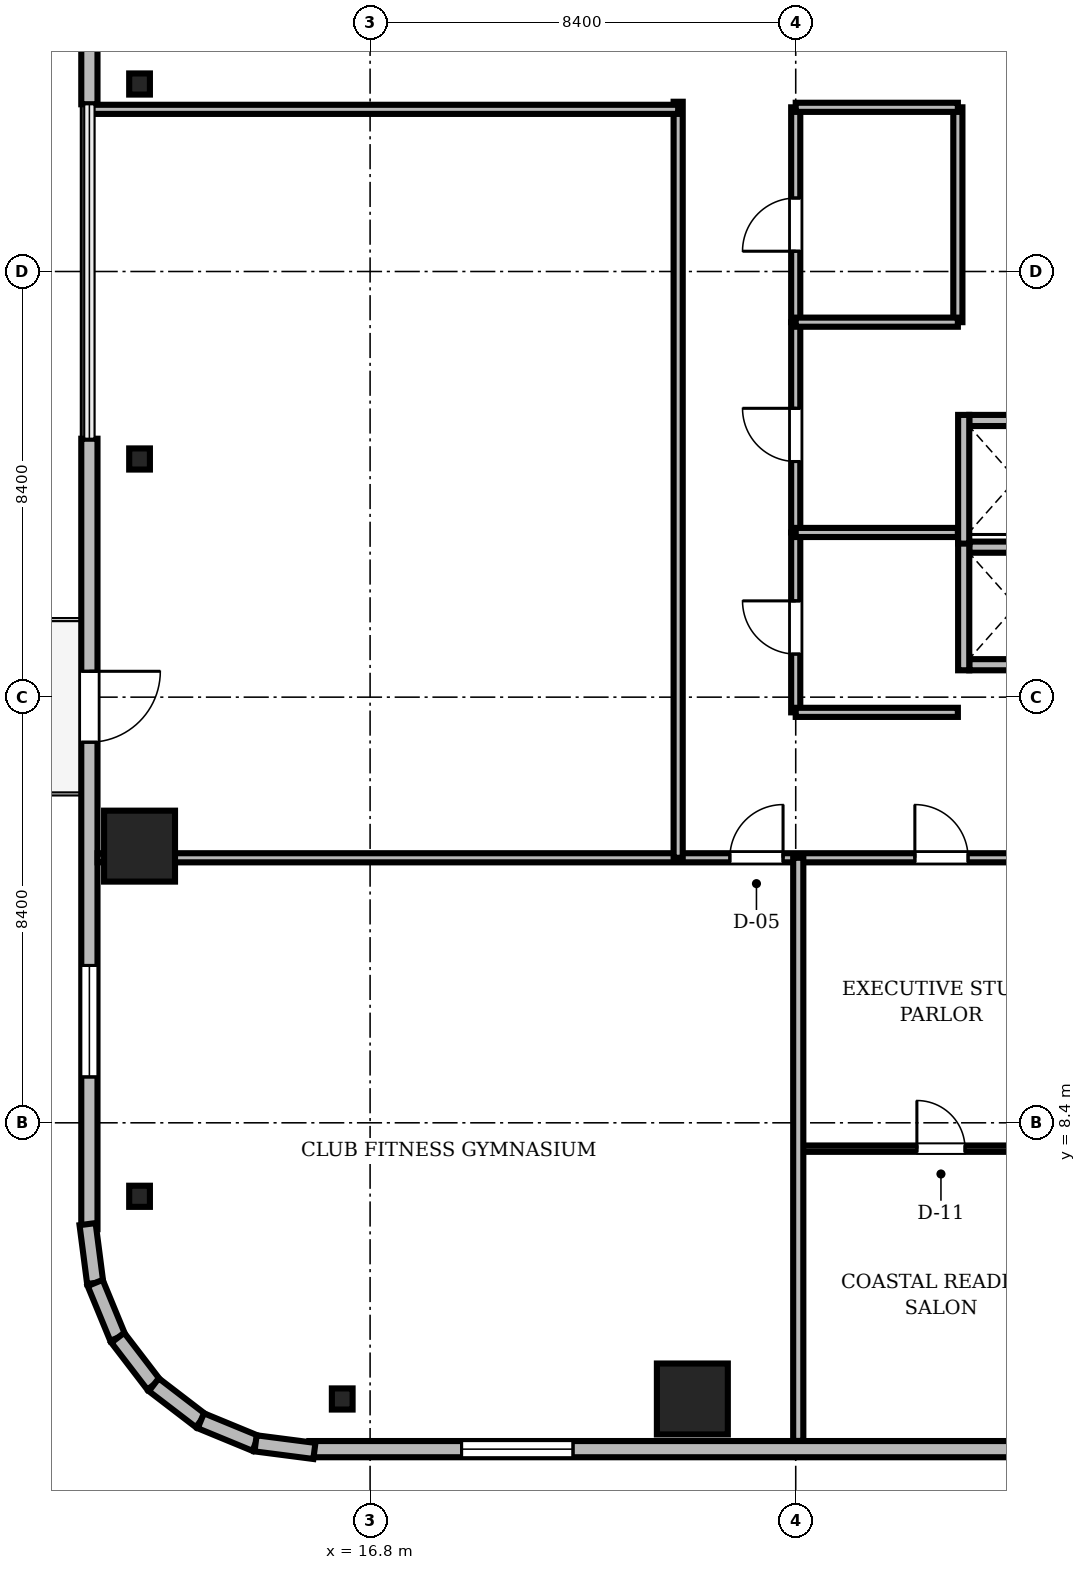
"""IFC4 building model, lengths in metres.
Left out: names, types, materials, properties, quantities, classifications, styles, units other than length and angle.
Written with IfcOpenShell. Run it as: python <this file> out.ifc"""

import sys

from ifc_helpers import new_model, si_unit, direction, frame, frame_2d, origin, origin_2d, place, context, subcontext, project, spatial, rectangle, i_section, extrude, source, transform, mapped, element, fill, save


model = new_model("IFC4")
c1 = context("Model", 3, precision=1e-05, world=origin(), true_north=direction((0.0, 1.0)))
c2 = subcontext(c1, "Body", "Model", "MODEL_VIEW")
j1 = project(units=[si_unit("LENGTHUNIT", "METRE"), si_unit("PLANEANGLEUNIT", "RADIAN")], contexts=[c1])
p1 = place(None, origin())
s1 = spatial("IfcSite", under=j1, at=p1, CompositionType="ELEMENT")
p2 = place(p1, origin())
s2 = spatial("IfcBuilding", under=s1, at=p2, CompositionType="ELEMENT")
p3 = place(p2, frame((0.0, 0.0, 229.8)))
s3 = spatial("IfcBuildingStorey", under=s2, at=p3, CompositionType="ELEMENT", Elevation=229.8)
m1 = source(origin(), c2, "Body", "SweptSolid", [
    extrude(rectangle(XDim=1.4, YDim=1.4, at=origin_2d()), origin(), (0.0, 0.0, 1.0), 3.53),
])
for number, where, z_axis, x_axis in (
    (1, (23.16, 2.95, 0.0), (0.0, 0.0, 1.0), (1.0, 0.0, 0.0)),
    (2, (12.25, 13.86, 0.0), (0.0, 0.0, 1.0), (1.0, 0.0, 0.0)),
):
    element("IfcColumn", number, at=place(p3, frame(where, z_axis=z_axis, x_axis=x_axis)), inside=s3, PredefinedType="COLUMN", context=c2, shape_type="MappedRepresentation", body=[
        mapped(m1, transform((0.0, 0.0, 0.0), scale=1.0)),
    ])
m2 = source(origin(), c2, "Body", "SweptSolid", [
    extrude(i_section(OverallWidth=0.409, OverallDepth=0.417, WebThickness=0.021, FlangeThickness=0.033, FilletRadius=0.015, at=origin_2d()), origin(), (0.0, 0.0, 1.0), 3.53),
])
for number, where, z_axis, x_axis in (
    (3, (16.25, 2.95, 0.0), (0.0, 0.0, 1.0), (1.0, 0.0, 0.0)),
    (4, (12.25, 28.9, 0.0), (0.0, 0.0, 1.0), (1.0, 0.0, 0.0)),
    (5, (12.25, 21.5, 0.0), (0.0, 0.0, 1.0), (1.0, 0.0, 0.0)),
    (6, (12.25, 6.95, 0.0), (0.0, 0.0, 1.0), (1.0, 0.0, 0.0)),
):
    element("IfcColumn", number, at=place(p3, frame(where, z_axis=z_axis, x_axis=x_axis)), inside=s3, PredefinedType="COLUMN", context=c2, shape_type="MappedRepresentation", body=[
        mapped(m2, transform((0.0, 0.0, 0.0), scale=1.0)),
    ])
m3 = source(origin(), c2, "Body", "SweptSolid", [
    extrude(rectangle(XDim=15.6, YDim=0.32, at=frame_2d((7.8, 0.0))), origin(), (0.0, 0.0, 1.0), 3.53),
])
p4 = place(p3, frame((15.6, 1.96, 0.0), z_axis=(0.0, 0.0, 1.0), x_axis=(1.0, 0.0, 0.0)))
e7 = element("IfcWall", 7, at=p4, inside=s3, PredefinedType="SOLIDWALL", context=c2, shape_type="MappedRepresentation", body=[
    mapped(m3, transform((0.0, 0.0, 0.0), scale=1.0)),
])
m4 = source(origin(), c2, "Body", "SweptSolid", [
    extrude(rectangle(XDim=2.2, YDim=2.4, at=frame_2d((1.1, 1.2))), frame((0.0, 0.17, 0.0), z_axis=(0.0, -1.0, 0.0), x_axis=(1.0, 0.0, 0.0)), (0.0, 0.0, 1.0), 0.34),
])
p5 = place(p4, frame((3.005, 0.0, 0.72)))
e8 = element("IfcOpeningElement", 8, at=p5, cuts=e7, PredefinedType="OPENING", context=c2, shape_type="MappedRepresentation", body=[
    mapped(m4, transform((0.0, 0.0, 0.0), scale=1.0)),
])
m5 = source(origin(), c2, "Body", "SweptSolid", [
    extrude(rectangle(XDim=15.6, YDim=0.32, at=frame_2d((7.8, 0.0))), origin(), (0.0, 0.0, 1.0), 3.53),
])
p6 = place(p3, frame((11.26, 44.1, 0.0), z_axis=(0.0, 0.0, 1.0), x_axis=(0.0, -1.0, 0.0)))
e9 = element("IfcWall", 9, at=p6, inside=s3, PredefinedType="SOLIDWALL", context=c2, shape_type="MappedRepresentation", body=[
    mapped(m5, transform((0.0, 0.0, 0.0), scale=1.0)),
])
p7 = place(p6, frame((3.005, 0.0, 0.72)))
e10 = element("IfcOpeningElement", 10, at=p7, cuts=e9, PredefinedType="OPENING", context=c2, shape_type="MappedRepresentation", body=[
    mapped(m4, transform((0.0, 0.0, 0.0), scale=1.0)),
])
p8 = place(p3, frame((11.26, 21.9, 0.0), z_axis=(0.0, 0.0, 1.0), x_axis=(0.0, -1.0, 0.0)))
e11 = element("IfcWall", 11, at=p8, inside=s3, PredefinedType="SOLIDWALL", context=c2, shape_type="MappedRepresentation", body=[
    mapped(m3, transform((0.0, 0.0, 0.0), scale=1.0)),
])
m6 = source(origin(), c2, "Body", "SweptSolid", [
    extrude(rectangle(XDim=1.4, YDim=2.3, at=frame_2d((0.7, 1.15))), frame((0.0, 0.17, 0.0), z_axis=(0.0, -1.0, 0.0), x_axis=(1.0, 0.0, 0.0)), (0.0, 0.0, 1.0), 0.34),
])
p9 = place(p8, frame((4.59, 0.0, 0.0)))
e12 = element("IfcOpeningElement", 12, at=p9, cuts=e11, PredefinedType="OPENING", context=c2, shape_type="MappedRepresentation", body=[
    mapped(m6, transform((0.0, 0.0, 0.0), scale=1.0)),
])
p10 = place(p8, frame((10.395, 0.0, 0.72)))
e13 = element("IfcOpeningElement", 13, at=p10, cuts=e11, PredefinedType="OPENING", context=c2, shape_type="MappedRepresentation", body=[
    mapped(m4, transform((0.0, 0.0, 0.0), scale=1.0)),
])
m7 = source(origin(), c2, "Body", "SweptSolid", [
    extrude(rectangle(XDim=1.171, YDim=0.32, at=frame_2d((0.585, 0.0))), origin(), (0.0, 0.0, 1.0), 3.53),
])
p11 = place(p3, frame((11.224, 6.401, 0.0), z_axis=(0.0, 0.0, 1.0), x_axis=(0.128269133229, -0.991739395941, 0.0)))
e14 = element("IfcWall", 14, at=p11, inside=s3, PredefinedType="SOLIDWALL", context=c2, shape_type="MappedRepresentation", body=[
    mapped(m7, transform((0.0, 0.0, 0.0), scale=1.0)),
])
m8 = source(origin(), c2, "Body", "SweptSolid", [
    extrude(rectangle(XDim=1.169, YDim=0.32, at=frame_2d((0.584, 0.0))), origin(), (0.0, 0.0, 1.0), 3.53),
])
for number, where, z_axis, x_axis in (
    (15, (11.375, 5.24, 0.0), (0.0, 0.0, 1.0), (0.381, -0.925, 0.0)),
    (16, (11.82, 4.159, 0.0), (0.0, 0.0, 1.0), (0.608, -0.794, 0.0)),
):
    element("IfcWall", number, at=place(p3, frame(where, z_axis=z_axis, x_axis=x_axis)), inside=s3, PredefinedType="SOLIDWALL", context=c2, shape_type="MappedRepresentation", body=[
        mapped(m8, transform((0.0, 0.0, 0.0), scale=1.0)),
    ])
m9 = source(origin(), c2, "Body", "SweptSolid", [
    extrude(rectangle(XDim=1.169, YDim=0.32, at=frame_2d((0.584, 0.0))), origin(), (0.0, 0.0, 1.0), 3.53),
])
p12 = place(p3, frame((12.531, 3.231, 0.0), z_axis=(0.0, 0.0, 1.0), x_axis=(0.793663520347, -0.608356981114, 0.0)))
e17 = element("IfcWall", 17, at=p12, inside=s3, PredefinedType="SOLIDWALL", context=c2, shape_type="MappedRepresentation", body=[
    mapped(m9, transform((0.0, 0.0, 0.0), scale=1.0)),
])
m10 = source(origin(), c2, "Body", "SweptSolid", [
    extrude(rectangle(XDim=1.169, YDim=0.32, at=frame_2d((0.585, 0.0))), origin(), (0.0, 0.0, 1.0), 3.53),
])
p13 = place(p3, frame((13.459, 2.52, 0.0), z_axis=(0.0, 0.0, 1.0), x_axis=(0.924479075121, -0.381232789334, 0.0)))
e18 = element("IfcWall", 18, at=p13, inside=s3, PredefinedType="SOLIDWALL", context=c2, shape_type="MappedRepresentation", body=[
    mapped(m10, transform((0.0, 0.0, 0.0), scale=1.0)),
])
m11 = source(origin(), c2, "Body", "SweptSolid", [
    extrude(rectangle(XDim=1.17, YDim=0.32, at=frame_2d((0.585, 0.0))), origin(), (0.0, 0.0, 1.0), 3.53),
])
p14 = place(p3, frame((14.54, 2.074, 0.0), z_axis=(0.0, 0.0, 1.0), x_axis=(0.991762485493, -0.128090485085, 0.0)))
e19 = element("IfcWall", 19, at=p14, inside=s3, PredefinedType="SOLIDWALL", context=c2, shape_type="MappedRepresentation", body=[
    mapped(m11, transform((0.0, 0.0, 0.0), scale=1.0)),
])
m12 = source(origin(), c2, "Body", "SweptSolid", [
    extrude(rectangle(XDim=1.85, YDim=0.22, at=frame_2d((0.925, 0.0))), origin(), (0.0, 0.0, 1.0), 2.972),
])
p15 = place(p3, frame((28.625, 17.44, 0.0), z_axis=(0.0, 0.0, 1.0), x_axis=(1.0, 0.0, 0.0)))
e20 = element("IfcWall", 20, at=p15, inside=s3, PredefinedType="SOLIDWALL", context=c2, shape_type="MappedRepresentation", body=[
    mapped(m12, transform((0.0, 0.0, 0.0), scale=1.0)),
])
m13 = source(origin(), c2, "Body", "SweptSolid", [
    extrude(rectangle(XDim=1.85, YDim=0.22, at=frame_2d((0.925, 0.0))), origin(), (0.0, 0.0, 1.0), 3.53),
])
p16 = place(p3, frame((28.625, 19.76, 0.0), z_axis=(0.0, 0.0, 1.0), x_axis=(1.0, 0.0, 0.0)))
e21 = element("IfcWall", 21, at=p16, inside=s3, PredefinedType="SOLIDWALL", context=c2, shape_type="MappedRepresentation", body=[
    mapped(m13, transform((0.0, 0.0, 0.0), scale=1.0)),
])
m14 = source(origin(), c2, "Body", "SweptSolid", [
    extrude(rectangle(XDim=2.54, YDim=0.22, at=frame_2d((1.27, 0.0))), origin(), (0.0, 0.0, 1.0), 2.972),
])
p17 = place(p3, frame((28.515, 17.33, 0.0), z_axis=(0.0, 0.0, 1.0), x_axis=(0.0, 1.0, 0.0)))
e22 = element("IfcWall", 22, at=p17, inside=s3, PredefinedType="SOLIDWALL", context=c2, shape_type="MappedRepresentation", body=[
    mapped(m14, transform((0.0, 0.0, 0.0), scale=1.0)),
])
p18 = place(p3, frame((28.625, 22.26, 0.0), z_axis=(0.0, 0.0, 1.0), x_axis=(1.0, 0.0, 0.0)))
e23 = element("IfcWall", 23, at=p18, inside=s3, PredefinedType="SOLIDWALL", context=c2, shape_type="MappedRepresentation", body=[
    mapped(m13, transform((0.0, 0.0, 0.0), scale=1.0)),
])
m15 = source(origin(), c2, "Body", "SweptSolid", [
    extrude(rectangle(XDim=2.54, YDim=0.22, at=frame_2d((1.27, 0.0))), origin(), (0.0, 0.0, 1.0), 3.53),
])
p19 = place(p3, frame((28.515, 19.83, 0.0), z_axis=(0.0, 0.0, 1.0), x_axis=(0.0, 1.0, 0.0)))
e24 = element("IfcWall", 24, at=p19, inside=s3, PredefinedType="SOLIDWALL", context=c2, shape_type="MappedRepresentation", body=[
    mapped(m15, transform((0.0, 0.0, 0.0), scale=1.0)),
])
m16 = source(origin(), c2, "Body", "SweptSolid", [
    extrude(rectangle(XDim=46.156, YDim=0.18, at=frame_2d((23.078, 0.0))), origin(), (0.0, 0.0, 1.0), 2.772),
])
p20 = place(p3, frame((11.422, 13.63, 0.0), z_axis=(0.0, 0.0, 1.0), x_axis=(1.0, 0.0, 0.0)))
e25 = element("IfcWall", 25, at=p20, inside=s3, PredefinedType="PARTITIONING", context=c2, shape_type="MappedRepresentation", body=[
    mapped(m16, transform((0.0, 0.0, 0.0), scale=1.0)),
])
m17 = source(origin(), c2, "Body", "SweptSolid", [
    extrude(rectangle(XDim=1.05, YDim=2.2, at=frame_2d((0.525, 1.1))), frame((0.0, 0.1, 0.0), z_axis=(0.0, -1.0, 0.0), x_axis=(1.0, 0.0, 0.0)), (0.0, 0.0, 1.0), 0.2),
])
p21 = place(p20, frame((12.478, 0.0, 0.0)))
e26 = element("IfcOpeningElement", 26, at=p21, cuts=e25, PredefinedType="OPENING", context=c2, shape_type="MappedRepresentation", body=[
    mapped(m17, transform((0.0, 0.0, 0.0), scale=1.0)),
])
p22 = place(p20, frame((16.129, 0.0, 0.0)))
e27 = element("IfcOpeningElement", 27, at=p22, cuts=e25, PredefinedType="OPENING", context=c2, shape_type="MappedRepresentation", body=[
    mapped(m17, transform((0.0, 0.0, 0.0), scale=1.0)),
])
p23 = place(p20, frame((21.772, 0.0, 0.0)))
e28 = element("IfcOpeningElement", 28, at=p23, cuts=e25, PredefinedType="OPENING", context=c2, shape_type="MappedRepresentation", body=[
    mapped(m17, transform((0.0, 0.0, 0.0), scale=1.0)),
])
p24 = place(p20, frame((28.47, 0.0, 0.0)))
e29 = element("IfcOpeningElement", 29, at=p24, cuts=e25, PredefinedType="OPENING", context=c2, shape_type="MappedRepresentation", body=[
    mapped(m17, transform((0.0, 0.0, 0.0), scale=1.0)),
])
p25 = place(p20, frame((34.113, 0.0, 0.0)))
e30 = element("IfcOpeningElement", 30, at=p25, cuts=e25, PredefinedType="OPENING", context=c2, shape_type="MappedRepresentation", body=[
    mapped(m17, transform((0.0, 0.0, 0.0), scale=1.0)),
])
p26 = place(p20, frame((37.498, 0.0, 0.0)))
e31 = element("IfcOpeningElement", 31, at=p26, cuts=e25, PredefinedType="OPENING", context=c2, shape_type="MappedRepresentation", body=[
    mapped(m17, transform((0.0, 0.0, 0.0), scale=1.0)),
])
m18 = source(origin(), c2, "Body", "SweptSolid", [
    extrude(rectangle(XDim=5.642, YDim=0.125, at=frame_2d((2.821, 0.0))), origin(), (0.0, 0.0, 1.0), 2.972),
])
p27 = place(p3, frame((25.25, 7.89, 0.0), z_axis=(0.0, 0.0, 1.0), x_axis=(1.0, 0.0, 0.0)))
e32 = element("IfcWall", 32, at=p27, inside=s3, PredefinedType="PARTITIONING", context=c2, shape_type="MappedRepresentation", body=[
    mapped(m18, transform((0.0, 0.0, 0.0), scale=1.0)),
])
m19 = source(origin(), c2, "Body", "SweptSolid", [
    extrude(rectangle(XDim=0.95, YDim=2.15, at=frame_2d((0.475, 1.075))), frame((0.0, 0.073, 0.0), z_axis=(0.0, -1.0, 0.0), x_axis=(1.0, 0.0, 0.0)), (0.0, 0.0, 1.0), 0.145),
])
p28 = place(p27, frame((2.341, 0.0, 0.0)))
e33 = element("IfcOpeningElement", 33, at=p28, cuts=e32, PredefinedType="OPENING", context=c2, shape_type="MappedRepresentation", body=[
    mapped(m19, transform((0.0, 0.0, 0.0), scale=1.0)),
])
m20 = source(origin(), c2, "Body", "SweptSolid", [
    extrude(rectangle(XDim=4.24, YDim=0.18, at=frame_2d((2.12, 0.0))), origin(), (0.0, 0.0, 1.0), 2.972),
])
p29 = place(p3, frame((25.2, 24.2, 0.0), z_axis=(0.0, 0.0, 1.0), x_axis=(0.0, 1.0, 0.0)))
e34 = element("IfcWall", 34, at=p29, inside=s3, PredefinedType="PARTITIONING", context=c2, shape_type="MappedRepresentation", body=[
    mapped(m20, transform((0.0, 0.0, 0.0), scale=1.0)),
])
p30 = place(p29, frame((1.4, 0.0, 0.0)))
e35 = element("IfcOpeningElement", 35, at=p30, cuts=e34, PredefinedType="OPENING", context=c2, shape_type="MappedRepresentation", body=[
    mapped(m17, transform((0.0, 0.0, 0.0), scale=1.0)),
])
m21 = source(origin(), c2, "Body", "SweptSolid", [
    extrude(rectangle(XDim=4.15, YDim=0.18, at=frame_2d((2.075, 0.0))), origin(), (0.0, 0.0, 1.0), 3.222),
])
p31 = place(p3, frame((25.2, 20.05, 0.0), z_axis=(0.0, 0.0, 1.0), x_axis=(0.0, 1.0, 0.0)))
e36 = element("IfcWall", 36, at=p31, inside=s3, PredefinedType="PARTITIONING", context=c2, shape_type="MappedRepresentation", body=[
    mapped(m21, transform((0.0, 0.0, 0.0), scale=1.0)),
])
p32 = place(p31, frame((1.4, 0.0, 0.0)))
e37 = element("IfcOpeningElement", 37, at=p32, cuts=e36, PredefinedType="OPENING", context=c2, shape_type="MappedRepresentation", body=[
    mapped(m17, transform((0.0, 0.0, 0.0), scale=1.0)),
])
m22 = source(origin(), c2, "Body", "SweptSolid", [
    extrude(rectangle(XDim=3.55, YDim=0.18, at=frame_2d((1.775, 0.0))), origin(), (0.0, 0.0, 1.0), 2.972),
])
p33 = place(p3, frame((25.2, 16.5, 0.0), z_axis=(0.0, 0.0, 1.0), x_axis=(0.0, 1.0, 0.0)))
e38 = element("IfcWall", 38, at=p33, inside=s3, PredefinedType="PARTITIONING", context=c2, shape_type="MappedRepresentation", body=[
    mapped(m22, transform((0.0, 0.0, 0.0), scale=1.0)),
])
p34 = place(p33, frame((1.15, 0.0, 0.0)))
e39 = element("IfcOpeningElement", 39, at=p34, cuts=e38, PredefinedType="OPENING", context=c2, shape_type="MappedRepresentation", body=[
    mapped(m17, transform((0.0, 0.0, 0.0), scale=1.0)),
])
m23 = source(origin(), c2, "Body", "SweptSolid", [
    extrude(rectangle(XDim=14.92, YDim=0.18, at=frame_2d((7.46, 0.0))), origin(), (0.0, 0.0, 1.0), 2.972),
])
p35 = place(p3, frame((22.88, 13.63, 0.0), z_axis=(0.0, 0.0, 1.0), x_axis=(0.0, 1.0, 0.0)))
e40 = element("IfcWall", 40, at=p35, inside=s3, PredefinedType="PARTITIONING", context=c2, shape_type="MappedRepresentation", body=[
    mapped(m23, transform((0.0, 0.0, 0.0), scale=1.0)),
])
m24 = source(origin(), c2, "Body", "SweptSolid", [
    extrude(rectangle(XDim=11.508, YDim=0.2, at=frame_2d((5.754, 0.0))), origin(), (0.0, 0.0, 1.0), 2.772),
])
p36 = place(p3, frame((25.25, 2.122, 0.0), z_axis=(0.0, 0.0, 1.0), x_axis=(0.0, 1.0, 0.0)))
e41 = element("IfcWall", 41, at=p36, inside=s3, PredefinedType="PARTITIONING", context=c2, shape_type="MappedRepresentation", body=[
    mapped(m24, transform((0.0, 0.0, 0.0), scale=1.0)),
])
m25 = source(origin(), c2, "Body", "SweptSolid", [
    extrude(rectangle(XDim=11.65, YDim=0.18, at=frame_2d((5.825, 0.0))), origin(), (0.0, 0.0, 1.0), 2.772),
])
p37 = place(p3, frame((11.23, 28.4, 0.0), z_axis=(0.0, 0.0, 1.0), x_axis=(1.0, 0.0, 0.0)))
e42 = element("IfcWall", 42, at=p37, inside=s3, PredefinedType="PARTITIONING", context=c2, shape_type="MappedRepresentation", body=[
    mapped(m25, transform((0.0, 0.0, 0.0), scale=1.0)),
])
p38 = place(p3, frame((28.4, 24.2, 0.0), z_axis=(0.0, 0.0, 1.0), x_axis=(0.0, 1.0, 0.0)))
e43 = element("IfcWall", 43, at=p38, inside=s3, PredefinedType="PARTITIONING", context=c2, shape_type="MappedRepresentation", body=[
    mapped(m20, transform((0.0, 0.0, 0.0), scale=1.0)),
])
m26 = source(origin(), c2, "Body", "SweptSolid", [
    extrude(rectangle(XDim=3.2, YDim=0.18, at=frame_2d((1.6, 0.0))), origin(), (0.0, 0.0, 1.0), 3.53),
])
for number, where, z_axis, x_axis in (
    (44, (25.2, 16.5, 0.0), (0.0, 0.0, 1.0), (1.0, 0.0, 0.0)),
    (45, (25.2, 20.05, 0.0), (0.0, 0.0, 1.0), (1.0, 0.0, 0.0)),
    (46, (25.2, 24.2, 0.0), (0.0, 0.0, 1.0), (1.0, 0.0, 0.0)),
    (47, (25.2, 28.44, 0.0), (0.0, 0.0, 1.0), (1.0, 0.0, 0.0)),
):
    element("IfcWall", number, at=place(p3, frame(where, z_axis=z_axis, x_axis=x_axis)), inside=s3, PredefinedType="PARTITIONING", context=c2, shape_type="MappedRepresentation", body=[
        mapped(m26, transform((0.0, 0.0, 0.0), scale=1.0)),
    ])
m27 = source(origin(), c2, "Body", "SweptSolid", [
    extrude(rectangle(XDim=2.2, YDim=2.4, at=frame_2d((1.1, 1.2))), frame((0.0, 0.03, 0.0), z_axis=(0.0, -1.0, 0.0), x_axis=(1.0, 0.0, 0.0)), (0.0, 0.0, 1.0), 0.06),
])
p39 = place(p5, origin())
e48 = element("IfcWindow", 48, at=p39, inside=s3, PartitioningType="SINGLE_PANEL", PredefinedType="WINDOW", context=c2, shape_type="MappedRepresentation", body=[
    mapped(m27, transform((0.0, 0.0, 0.0), scale=1.0)),
])
fill(e8, e48)
m28 = source(origin(), c2, "Body", "SweptSolid", [
    extrude(rectangle(XDim=1.4, YDim=2.3, at=frame_2d((0.7, 1.15))), frame((0.0, 0.025, 0.0), z_axis=(0.0, -1.0, 0.0), x_axis=(1.0, 0.0, 0.0)), (0.0, 0.0, 1.0), 0.05),
])
p40 = place(p9, frame((1.4, 0.0, 0.0), z_axis=(0.0, 0.0, 1.0), x_axis=(-1.0, 0.0, 0.0)))
e49 = element("IfcDoor", 49, at=p40, inside=s3, OperationType="DOUBLE_DOOR_SLIDING", PredefinedType="DOOR", context=c2, shape_type="MappedRepresentation", body=[
    mapped(m28, transform((0.0, 0.0, 0.0), scale=1.0)),
])
fill(e12, e49)
p41 = place(p10, origin())
e50 = element("IfcWindow", 50, at=p41, inside=s3, PartitioningType="SINGLE_PANEL", PredefinedType="WINDOW", context=c2, shape_type="MappedRepresentation", body=[
    mapped(m27, transform((0.0, 0.0, 0.0), scale=1.0)),
])
fill(e13, e50)
m29 = source(origin(), c2, "Body", "SweptSolid", [
    extrude(rectangle(XDim=1.05, YDim=2.2, at=frame_2d((0.525, 1.1))), frame((0.0, 0.025, 0.0), z_axis=(0.0, -1.0, 0.0), x_axis=(1.0, 0.0, 0.0)), (0.0, 0.0, 1.0), 0.05),
])
p42 = place(p21, origin())
e51 = element("IfcDoor", 51, at=p42, inside=s3, OperationType="SINGLE_SWING_RIGHT", PredefinedType="DOOR", context=c2, shape_type="MappedRepresentation", body=[
    mapped(m29, transform((0.0, 0.0, 0.0), scale=1.0)),
])
fill(e26, e51)
p43 = place(p22, origin())
e52 = element("IfcDoor", 52, at=p43, inside=s3, OperationType="SINGLE_SWING_LEFT", PredefinedType="DOOR", context=c2, shape_type="MappedRepresentation", body=[
    mapped(m29, transform((0.0, 0.0, 0.0), scale=1.0)),
])
fill(e27, e52)
m30 = source(origin(), c2, "Body", "SweptSolid", [
    extrude(rectangle(XDim=0.95, YDim=2.15, at=frame_2d((0.475, 1.075))), frame((0.0, 0.025, 0.0), z_axis=(0.0, -1.0, 0.0), x_axis=(1.0, 0.0, 0.0)), (0.0, 0.0, 1.0), 0.05),
])
p44 = place(p28, origin())
e53 = element("IfcDoor", 53, at=p44, inside=s3, OperationType="SINGLE_SWING_LEFT", PredefinedType="DOOR", context=c2, shape_type="MappedRepresentation", body=[
    mapped(m30, transform((0.0, 0.0, 0.0), scale=1.0)),
])
fill(e33, e53)
p45 = place(p30, origin())
e54 = element("IfcDoor", 54, at=p45, inside=s3, OperationType="SINGLE_SWING_LEFT", PredefinedType="DOOR", context=c2, shape_type="MappedRepresentation", body=[
    mapped(m29, transform((0.0, 0.0, 0.0), scale=1.0)),
])
fill(e35, e54)
p46 = place(p32, origin())
e55 = element("IfcDoor", 55, at=p46, inside=s3, OperationType="SINGLE_SWING_RIGHT", PredefinedType="DOOR", context=c2, shape_type="MappedRepresentation", body=[
    mapped(m29, transform((0.0, 0.0, 0.0), scale=1.0)),
])
fill(e37, e55)
p47 = place(p34, origin())
e56 = element("IfcDoor", 56, at=p47, inside=s3, OperationType="SINGLE_SWING_RIGHT", PredefinedType="DOOR", context=c2, shape_type="MappedRepresentation", body=[
    mapped(m29, transform((0.0, 0.0, 0.0), scale=1.0)),
])
fill(e39, e56)
save(model, sys.argv[1])
